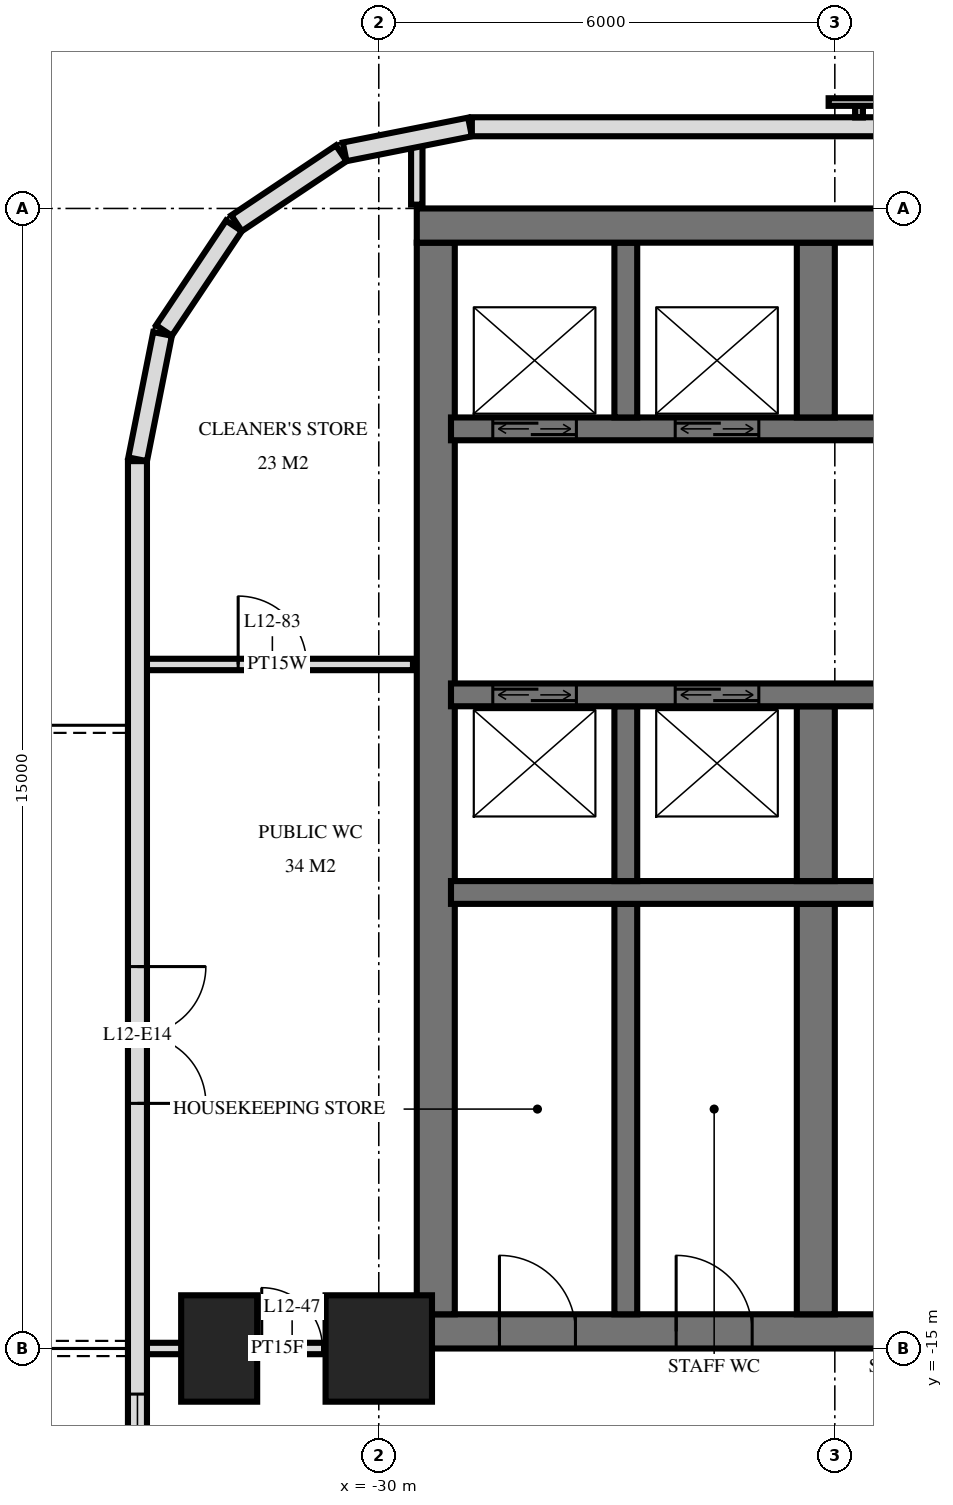
"""IFC4 building model, lengths in metres.
Left out: names, types, materials, properties, quantities, classifications, styles, units other than length and angle.
Written with IfcOpenShell. Run it as: python <this file> out.ifc"""

import sys

from ifc_helpers import new_model, si_unit, direction, frame, frame_2d, origin, origin_2d, place, context, subcontext, project, spatial, rectangle, extrude, element, fill, save


model = new_model("IFC4")
c1 = context("Model", 3, precision=1e-05, world=origin(), true_north=direction((0.0, 1.0)))
c2 = subcontext(c1, "Body", "Model", "MODEL_VIEW")
j1 = project(units=[si_unit("LENGTHUNIT", "METRE"), si_unit("PLANEANGLEUNIT", "RADIAN")], contexts=[c1])
p1 = place(None, origin())
s1 = spatial("IfcSite", under=j1, at=p1, CompositionType="ELEMENT")
p2 = place(p1, origin())
s2 = spatial("IfcBuilding", under=s1, at=p2, CompositionType="ELEMENT")
p3 = place(p2, frame((0.0, 0.0, 52.8)))
s3 = spatial("IfcBuildingStorey", under=s2, at=p3, CompositionType="ELEMENT", Elevation=52.8)
p4 = place(p3, frame((-32.1, -15.0, 0.0), z_axis=(0.0, 0.0, 1.0), x_axis=(0.0, 1.0, 0.0)))
e1 = element("IfcColumn", 1, at=p4, inside=s3, PredefinedType="COLUMN", context=c2, shape_type="SweptSolid", body=[
    extrude(rectangle(XDim=1.4, YDim=1.0, at=origin_2d()), origin(), (0.0, 0.0, 1.0), 3.6),
])
p5 = place(p3, frame((-30.0, -15.0, 0.0), z_axis=(0.0, 0.0, 1.0), x_axis=(1.0, 0.0, 0.0)))
e2 = element("IfcColumn", 2, at=p5, inside=s3, PredefinedType="COLUMN", context=c2, shape_type="SweptSolid", body=[
    extrude(rectangle(XDim=1.4, YDim=1.4, at=origin_2d()), origin(), (0.0, 0.0, 1.0), 3.6),
])
p6 = place(p3, frame((-29.5, -0.225, 0.0), z_axis=(0.0, 0.0, 1.0), x_axis=(1.0, 0.0, 0.0)))
e3 = element("IfcWall", 3, at=p6, inside=s3, PredefinedType="SHEAR", context=c2, shape_type="SweptSolid", body=[
    extrude(rectangle(XDim=19.5, YDim=0.45, at=frame_2d((9.75, 0.0))), origin(), (0.0, 0.0, 1.0), 3.6),
])
p7 = place(p3, frame((-29.5, -14.775, 0.0), z_axis=(0.0, 0.0, 1.0), x_axis=(1.0, 0.0, 0.0)))
e4 = element("IfcWall", 4, at=p7, inside=s3, PredefinedType="SHEAR", context=c2, shape_type="SweptSolid", body=[
    extrude(rectangle(XDim=19.5, YDim=0.45, at=frame_2d((9.75, 0.0))), origin(), (0.0, 0.0, 1.0), 3.6),
])
p8 = place(p7, frame((11.2, 0.0, 0.0)))
e5 = element("IfcOpeningElement", 5, at=p8, cuts=e4, PredefinedType="OPENING", context=c2, shape_type="SweptSolid", body=[
    extrude(rectangle(XDim=1.2, YDim=2.1, at=frame_2d((0.6, 1.05))), frame((0.0, 0.235, 0.0), z_axis=(0.0, -1.0, 0.0), x_axis=(1.0, 0.0, 0.0)), (0.0, 0.0, 1.0), 0.47),
])
p9 = place(p7, frame((14.25, 0.0, 0.0)))
e6 = element("IfcOpeningElement", 6, at=p9, cuts=e4, PredefinedType="OPENING", context=c2, shape_type="SweptSolid", body=[
    extrude(rectangle(XDim=1.1, YDim=2.1, at=frame_2d((0.55, 1.05))), frame((0.0, 0.235, 0.0), z_axis=(0.0, -1.0, 0.0), x_axis=(1.0, 0.0, 0.0)), (0.0, 0.0, 1.0), 0.47),
])
p10 = place(p7, frame((8.5, 0.0, 0.0)))
e7 = element("IfcOpeningElement", 7, at=p10, cuts=e4, PredefinedType="OPENING", context=c2, shape_type="SweptSolid", body=[
    extrude(rectangle(XDim=0.9, YDim=2.1, at=frame_2d((0.45, 1.05))), frame((0.0, 0.235, 0.0), z_axis=(0.0, -1.0, 0.0), x_axis=(1.0, 0.0, 0.0)), (0.0, 0.0, 1.0), 0.47),
])
p11 = place(p7, frame((6.05, 0.0, 0.0)))
e8 = element("IfcOpeningElement", 8, at=p11, cuts=e4, PredefinedType="OPENING", context=c2, shape_type="SweptSolid", body=[
    extrude(rectangle(XDim=1.0, YDim=2.1, at=frame_2d((0.5, 1.05))), frame((0.0, 0.235, 0.0), z_axis=(0.0, -1.0, 0.0), x_axis=(1.0, 0.0, 0.0)), (0.0, 0.0, 1.0), 0.47),
])
p12 = place(p7, frame((3.413, 0.0, 0.0)))
e9 = element("IfcOpeningElement", 9, at=p12, cuts=e4, PredefinedType="OPENING", context=c2, shape_type="SweptSolid", body=[
    extrude(rectangle(XDim=1.0, YDim=2.1, at=frame_2d((0.5, 1.05))), frame((0.0, 0.235, 0.0), z_axis=(0.0, -1.0, 0.0), x_axis=(1.0, 0.0, 0.0)), (0.0, 0.0, 1.0), 0.47),
])
p13 = place(p7, frame((1.087, 0.0, 0.0)))
e10 = element("IfcOpeningElement", 10, at=p13, cuts=e4, PredefinedType="OPENING", context=c2, shape_type="SweptSolid", body=[
    extrude(rectangle(XDim=1.0, YDim=2.1, at=frame_2d((0.5, 1.05))), frame((0.0, 0.235, 0.0), z_axis=(0.0, -1.0, 0.0), x_axis=(1.0, 0.0, 0.0)), (0.0, 0.0, 1.0), 0.47),
])
p14 = place(p3, frame((-29.25, -14.55, 0.0), z_axis=(0.0, 0.0, 1.0), x_axis=(0.0, 1.0, 0.0)))
e11 = element("IfcWall", 11, at=p14, inside=s3, PredefinedType="SHEAR", context=c2, shape_type="SweptSolid", body=[
    extrude(rectangle(XDim=14.1, YDim=0.5, at=frame_2d((7.05, 0.0))), origin(), (0.0, 0.0, 1.0), 3.6),
])
p15 = place(p3, frame((-29.05, -2.9, 0.0), z_axis=(0.0, 0.0, 1.0), x_axis=(1.0, 0.0, 0.0)))
e12 = element("IfcWall", 12, at=p15, inside=s3, PredefinedType="SHEAR", context=c2, shape_type="SweptSolid", body=[
    extrude(rectangle(XDim=18.7, YDim=0.3, at=frame_2d((9.35, 0.0))), origin(), (0.0, 0.0, 1.0), 3.6),
])
p16 = place(p15, frame((2.95, 0.0, 0.0)))
e13 = element("IfcOpeningElement", 13, at=p16, cuts=e12, PredefinedType="OPENING", context=c2, shape_type="SweptSolid", body=[
    extrude(rectangle(XDim=1.1, YDim=2.1, at=frame_2d((0.55, 1.05))), frame((0.0, 0.16, 0.0), z_axis=(0.0, -1.0, 0.0), x_axis=(1.0, 0.0, 0.0)), (0.0, 0.0, 1.0), 0.32),
])
p17 = place(p15, frame((0.55, 0.0, 0.0)))
e14 = element("IfcOpeningElement", 14, at=p17, cuts=e12, PredefinedType="OPENING", context=c2, shape_type="SweptSolid", body=[
    extrude(rectangle(XDim=1.1, YDim=2.1, at=frame_2d((0.55, 1.05))), frame((0.0, 0.16, 0.0), z_axis=(0.0, -1.0, 0.0), x_axis=(1.0, 0.0, 0.0)), (0.0, 0.0, 1.0), 0.32),
])
p18 = place(p15, frame((10.9, 0.0, 0.0)))
e15 = element("IfcOpeningElement", 15, at=p18, cuts=e12, PredefinedType="OPENING", context=c2, shape_type="SweptSolid", body=[
    extrude(rectangle(XDim=0.9, YDim=2.1, at=frame_2d((0.45, 1.05))), frame((0.0, 0.16, 0.0), z_axis=(0.0, -1.0, 0.0), x_axis=(1.0, 0.0, 0.0)), (0.0, 0.0, 1.0), 0.32),
])
p19 = place(p15, frame((16.85, 0.0, 0.0)))
e16 = element("IfcOpeningElement", 16, at=p19, cuts=e12, PredefinedType="OPENING", context=c2, shape_type="SweptSolid", body=[
    extrude(rectangle(XDim=1.0, YDim=2.1, at=frame_2d((0.5, 1.05))), frame((0.0, 0.16, 0.0), z_axis=(0.0, -1.0, 0.0), x_axis=(1.0, 0.0, 0.0)), (0.0, 0.0, 1.0), 0.32),
])
p20 = place(p15, frame((13.85, 0.0, 0.0)))
e17 = element("IfcOpeningElement", 17, at=p20, cuts=e12, PredefinedType="OPENING", context=c2, shape_type="SweptSolid", body=[
    extrude(rectangle(XDim=1.0, YDim=2.1, at=frame_2d((0.5, 1.05))), frame((0.0, 0.16, 0.0), z_axis=(0.0, -1.0, 0.0), x_axis=(1.0, 0.0, 0.0)), (0.0, 0.0, 1.0), 0.32),
])
p21 = place(p15, frame((5.6, 0.0, 0.0)))
e18 = element("IfcOpeningElement", 18, at=p21, cuts=e12, PredefinedType="OPENING", context=c2, shape_type="SweptSolid", body=[
    extrude(rectangle(XDim=1.0, YDim=2.1, at=frame_2d((0.5, 1.05))), frame((0.0, 0.16, 0.0), z_axis=(0.0, -1.0, 0.0), x_axis=(1.0, 0.0, 0.0)), (0.0, 0.0, 1.0), 0.32),
])
p22 = place(p3, frame((-29.05, -6.4, 0.0), z_axis=(0.0, 0.0, 1.0), x_axis=(1.0, 0.0, 0.0)))
e19 = element("IfcWall", 19, at=p22, inside=s3, PredefinedType="SHEAR", context=c2, shape_type="SweptSolid", body=[
    extrude(rectangle(XDim=18.7, YDim=0.3, at=frame_2d((9.35, 0.0))), origin(), (0.0, 0.0, 1.0), 3.6),
])
p23 = place(p22, frame((2.95, 0.0, 0.0)))
e20 = element("IfcOpeningElement", 20, at=p23, cuts=e19, PredefinedType="OPENING", context=c2, shape_type="SweptSolid", body=[
    extrude(rectangle(XDim=1.1, YDim=2.1, at=frame_2d((0.55, 1.05))), frame((0.0, 0.16, 0.0), z_axis=(0.0, -1.0, 0.0), x_axis=(1.0, 0.0, 0.0)), (0.0, 0.0, 1.0), 0.32),
])
p24 = place(p22, frame((0.55, 0.0, 0.0)))
e21 = element("IfcOpeningElement", 21, at=p24, cuts=e19, PredefinedType="OPENING", context=c2, shape_type="SweptSolid", body=[
    extrude(rectangle(XDim=1.1, YDim=2.1, at=frame_2d((0.55, 1.05))), frame((0.0, 0.16, 0.0), z_axis=(0.0, -1.0, 0.0), x_axis=(1.0, 0.0, 0.0)), (0.0, 0.0, 1.0), 0.32),
])
p25 = place(p22, frame((10.8, 0.0, 0.0)))
e22 = element("IfcOpeningElement", 22, at=p25, cuts=e19, PredefinedType="OPENING", context=c2, shape_type="SweptSolid", body=[
    extrude(rectangle(XDim=1.1, YDim=2.1, at=frame_2d((0.55, 1.05))), frame((0.0, 0.16, 0.0), z_axis=(0.0, -1.0, 0.0), x_axis=(1.0, 0.0, 0.0)), (0.0, 0.0, 1.0), 0.32),
])
p26 = place(p22, frame((5.6, 0.0, 0.0)))
e23 = element("IfcOpeningElement", 23, at=p26, cuts=e19, PredefinedType="OPENING", context=c2, shape_type="SweptSolid", body=[
    extrude(rectangle(XDim=1.0, YDim=2.1, at=frame_2d((0.5, 1.05))), frame((0.0, 0.16, 0.0), z_axis=(0.0, -1.0, 0.0), x_axis=(1.0, 0.0, 0.0)), (0.0, 0.0, 1.0), 0.32),
])
p27 = place(p3, frame((-29.05, -9.0, 0.0), z_axis=(0.0, 0.0, 1.0), x_axis=(1.0, 0.0, 0.0)))
e24 = element("IfcWall", 24, at=p27, inside=s3, PredefinedType="SHEAR", context=c2, shape_type="SweptSolid", body=[
    extrude(rectangle(XDim=18.7, YDim=0.3, at=frame_2d((9.35, 0.0))), origin(), (0.0, 0.0, 1.0), 3.6),
])
p28 = place(p27, frame((13.8, 0.0, 0.0)))
e25 = element("IfcOpeningElement", 25, at=p28, cuts=e24, PredefinedType="OPENING", context=c2, shape_type="SweptSolid", body=[
    extrude(rectangle(XDim=1.1, YDim=2.1, at=frame_2d((0.55, 1.05))), frame((0.0, 0.16, 0.0), z_axis=(0.0, -1.0, 0.0), x_axis=(1.0, 0.0, 0.0)), (0.0, 0.0, 1.0), 0.32),
])
for number, where, z_axis, x_axis in (
    (26, (-24.25, -2.75, 0.0), (0.0, 0.0, 1.0), (0.0, 1.0, 0.0)),
    (27, (-24.25, -8.85, 0.0), (0.0, 0.0, 1.0), (0.0, 1.0, 0.0)),
):
    element("IfcWall", number, at=place(p3, frame(where, z_axis=z_axis, x_axis=x_axis)), inside=s3, PredefinedType="SHEAR", context=c2, shape_type="SweptSolid", body=[
        extrude(rectangle(XDim=2.3, YDim=0.5, at=frame_2d((1.15, 0.0))), origin(), (0.0, 0.0, 1.0), 3.6),
    ])
p29 = place(p3, frame((-24.25, -14.55, 0.0), z_axis=(0.0, 0.0, 1.0), x_axis=(0.0, 1.0, 0.0)))
e28 = element("IfcWall", 28, at=p29, inside=s3, PredefinedType="SHEAR", context=c2, shape_type="SweptSolid", body=[
    extrude(rectangle(XDim=5.4, YDim=0.5, at=frame_2d((2.7, 0.0))), origin(), (0.0, 0.0, 1.0), 3.6),
])
for number, where, z_axis, x_axis in (
    (29, (-26.75, -2.75, 0.0), (0.0, 0.0, 1.0), (0.0, 1.0, 0.0)),
    (30, (-26.75, -8.85, 0.0), (0.0, 0.0, 1.0), (0.0, 1.0, 0.0)),
):
    element("IfcWall", number, at=place(p3, frame(where, z_axis=z_axis, x_axis=x_axis)), inside=s3, PredefinedType="SHEAR", context=c2, shape_type="SweptSolid", body=[
        extrude(rectangle(XDim=2.3, YDim=0.3, at=frame_2d((1.15, 0.0))), origin(), (0.0, 0.0, 1.0), 3.6),
    ])
p30 = place(p3, frame((-26.75, -14.55, 0.0), z_axis=(0.0, 0.0, 1.0), x_axis=(0.0, 1.0, 0.0)))
e31 = element("IfcWall", 31, at=p30, inside=s3, PredefinedType="SHEAR", context=c2, shape_type="SweptSolid", body=[
    extrude(rectangle(XDim=5.4, YDim=0.3, at=frame_2d((2.7, 0.0))), origin(), (0.0, 0.0, 1.0), 3.6),
])
p31 = place(p3, frame((28.775, 1.075, 0.0), z_axis=(0.0, 0.0, 1.0), x_axis=(-1.0, 0.0, 0.0)))
e32 = element("IfcWall", 32, at=p31, inside=s3, PredefinedType="SOLIDWALL", context=c2, shape_type="SweptSolid", body=[
    extrude(rectangle(XDim=57.551, YDim=0.25, at=frame_2d((28.775, 0.0))), origin(), (0.0, 0.0, 1.0), 3.32),
])
p32 = place(p31, frame((25.575, 0.0, 0.3)))
e33 = element("IfcOpeningElement", 33, at=p32, cuts=e32, PredefinedType="OPENING", context=c2, shape_type="SweptSolid", body=[
    extrude(rectangle(XDim=2.4, YDim=2.1, at=frame_2d((1.2, 1.05))), frame((0.0, 0.135, 0.0), z_axis=(0.0, -1.0, 0.0), x_axis=(1.0, 0.0, 0.0)), (0.0, 0.0, 1.0), 0.27),
])
p33 = place(p31, frame((30.275, 0.0, 0.3)))
e34 = element("IfcOpeningElement", 34, at=p33, cuts=e32, PredefinedType="OPENING", context=c2, shape_type="SweptSolid", body=[
    extrude(rectangle(XDim=2.4, YDim=2.1, at=frame_2d((1.2, 1.05))), frame((0.0, 0.135, 0.0), z_axis=(0.0, -1.0, 0.0), x_axis=(1.0, 0.0, 0.0)), (0.0, 0.0, 1.0), 0.27),
])
p34 = place(p31, frame((33.275, 0.0, 0.3)))
e35 = element("IfcOpeningElement", 35, at=p34, cuts=e32, PredefinedType="OPENING", context=c2, shape_type="SweptSolid", body=[
    extrude(rectangle(XDim=2.4, YDim=2.1, at=frame_2d((1.2, 1.05))), frame((0.0, 0.135, 0.0), z_axis=(0.0, -1.0, 0.0), x_axis=(1.0, 0.0, 0.0)), (0.0, 0.0, 1.0), 0.27),
])
p35 = place(p3, frame((-28.8, 1.073, 0.0), z_axis=(0.0, 0.0, 1.0), x_axis=(-0.980803419081, -0.194999110559, 0.0)))
e36 = element("IfcWall", 36, at=p35, inside=s3, PredefinedType="SOLIDWALL", context=c2, shape_type="SweptSolid", body=[
    extrude(rectangle(XDim=1.681, YDim=0.25, at=frame_2d((0.841, 0.0))), origin(), (0.0, 0.0, 1.0), 3.32),
])
for number, where, z_axis, x_axis in (
    (37, (-30.494, 0.726, 0.0), (0.0, 0.0, 1.0), (-0.831, -0.556, 0.0)),
    (38, (-31.906, -0.229, 0.0), (0.0, 0.0, 1.0), (-0.556, -0.831, 0.0)),
):
    element("IfcWall", number, at=place(p3, frame(where, z_axis=z_axis, x_axis=x_axis)), inside=s3, PredefinedType="SOLIDWALL", context=c2, shape_type="SweptSolid", body=[
        extrude(rectangle(XDim=1.656, YDim=0.25, at=frame_2d((0.828, 0.0))), origin(), (0.0, 0.0, 1.0), 3.32),
    ])
p36 = place(p3, frame((-32.844, -1.651, 0.0), z_axis=(0.0, 0.0, 1.0), x_axis=(-0.19513878023, -0.980775640221, 0.0)))
e39 = element("IfcWall", 39, at=p36, inside=s3, PredefinedType="SOLIDWALL", context=c2, shape_type="SweptSolid", body=[
    extrude(rectangle(XDim=1.681, YDim=0.25, at=frame_2d((0.841, 0.0))), origin(), (0.0, 0.0, 1.0), 3.32),
])
p37 = place(p3, frame((-33.175, -3.325, 0.0), z_axis=(0.0, 0.0, 1.0), x_axis=(0.0, -1.0, 0.0)))
e40 = element("IfcWall", 40, at=p37, inside=s3, PredefinedType="SOLIDWALL", context=c2, shape_type="SweptSolid", body=[
    extrude(rectangle(XDim=21.551, YDim=0.25, at=frame_2d((10.775, 0.0))), origin(), (0.0, 0.0, 1.0), 3.32),
])
p38 = place(p37, frame((6.65, 0.0, 0.0)))
e41 = element("IfcOpeningElement", 41, at=p38, cuts=e40, PredefinedType="OPENING", context=c2, shape_type="SweptSolid", body=[
    extrude(rectangle(XDim=1.8, YDim=2.4, at=frame_2d((0.9, 1.2))), frame((0.0, 0.135, 0.0), z_axis=(0.0, -1.0, 0.0), x_axis=(1.0, 0.0, 0.0)), (0.0, 0.0, 1.0), 0.27),
])
p39 = place(p37, frame((12.275, 0.0, 0.3)))
e42 = element("IfcOpeningElement", 42, at=p39, cuts=e40, PredefinedType="OPENING", context=c2, shape_type="SweptSolid", body=[
    extrude(rectangle(XDim=1.2, YDim=2.1, at=frame_2d((0.6, 1.05))), frame((0.0, 0.135, 0.0), z_axis=(0.0, -1.0, 0.0), x_axis=(1.0, 0.0, 0.0)), (0.0, 0.0, 1.0), 0.27),
])
p40 = place(p37, frame((14.675, 0.0, 0.0)))
e43 = element("IfcOpeningElement", 43, at=p40, cuts=e40, PredefinedType="OPENING", context=c2, shape_type="SweptSolid", body=[
    extrude(rectangle(XDim=1.8, YDim=2.4, at=frame_2d((0.9, 1.2))), frame((0.0, 0.135, 0.0), z_axis=(0.0, -1.0, 0.0), x_axis=(1.0, 0.0, 0.0)), (0.0, 0.0, 1.0), 0.27),
])
p41 = place(p37, frame((18.875, 0.0, 0.0)))
e44 = element("IfcOpeningElement", 44, at=p41, cuts=e40, PredefinedType="OPENING", context=c2, shape_type="SweptSolid", body=[
    extrude(rectangle(XDim=1.8, YDim=2.4, at=frame_2d((0.9, 1.2))), frame((0.0, 0.135, 0.0), z_axis=(0.0, -1.0, 0.0), x_axis=(1.0, 0.0, 0.0)), (0.0, 0.0, 1.0), 0.27),
])
p42 = place(p3, frame((-29.5, 0.05, 0.0), z_axis=(0.0, 0.0, 1.0), x_axis=(0.0, 1.0, 0.0)))
e45 = element("IfcWall", 45, at=p42, inside=s3, PredefinedType="PARTITIONING", context=c2, shape_type="SweptSolid", body=[
    extrude(rectangle(XDim=0.827, YDim=0.15, at=frame_2d((0.414, 0.0))), origin(), (0.0, 0.0, 1.0), 3.32),
])
p43 = place(p3, frame((-33.12, -15.0, 0.0), z_axis=(0.0, 0.0, 1.0), x_axis=(1.0, 0.0, 0.0)))
e46 = element("IfcWall", 46, at=p43, inside=s3, PredefinedType="PARTITIONING", context=c2, shape_type="SweptSolid", body=[
    extrude(rectangle(XDim=3.57, YDim=0.15, at=frame_2d((1.785, 0.0))), origin(), (0.0, 0.0, 1.0), 3.32),
])
p44 = place(p43, frame((1.58, 0.0, 0.0)))
e47 = element("IfcOpeningElement", 47, at=p44, cuts=e46, PredefinedType="OPENING", context=c2, shape_type="SweptSolid", body=[
    extrude(rectangle(XDim=0.8, YDim=2.1, at=frame_2d((0.4, 1.05))), frame((0.0, 0.085, 0.0), z_axis=(0.0, -1.0, 0.0), x_axis=(1.0, 0.0, 0.0)), (0.0, 0.0, 1.0), 0.17),
])
p45 = place(p3, frame((-33.12, -6.0, 0.0), z_axis=(0.0, 0.0, 1.0), x_axis=(1.0, 0.0, 0.0)))
e48 = element("IfcWall", 48, at=p45, inside=s3, PredefinedType="PLUMBINGWALL", context=c2, shape_type="SweptSolid", body=[
    extrude(rectangle(XDim=3.57, YDim=0.15, at=frame_2d((1.785, 0.0))), origin(), (0.0, 0.0, 1.0), 3.32),
])
p46 = place(p45, frame((1.27, 0.0, 0.0)))
e49 = element("IfcOpeningElement", 49, at=p46, cuts=e48, PredefinedType="OPENING", context=c2, shape_type="SweptSolid", body=[
    extrude(rectangle(XDim=0.9, YDim=2.1, at=frame_2d((0.45, 1.05))), frame((0.0, 0.085, 0.0), z_axis=(0.0, -1.0, 0.0), x_axis=(1.0, 0.0, 0.0)), (0.0, 0.0, 1.0), 0.17),
])
p47 = place(p38, origin())
e50 = element("IfcDoor", 50, at=p47, inside=s3, OperationType="DOUBLE_DOOR_SINGLE_SWING", PredefinedType="DOOR", context=c2, shape_type="SweptSolid", body=[
    extrude(rectangle(XDim=1.8, YDim=2.4, at=frame_2d((0.9, 1.2))), frame((0.0, 0.025, 0.0), z_axis=(0.0, -1.0, 0.0), x_axis=(1.0, 0.0, 0.0)), (0.0, 0.0, 1.0), 0.05),
])
fill(e41, e50)
p48 = place(p39, origin())
e51 = element("IfcWindow", 51, at=p48, inside=s3, PartitioningType="SINGLE_PANEL", PredefinedType="WINDOW", context=c2, shape_type="SweptSolid", body=[
    extrude(rectangle(XDim=1.2, YDim=2.1, at=frame_2d((0.6, 1.05))), frame((0.0, 0.03, 0.0), z_axis=(0.0, -1.0, 0.0), x_axis=(1.0, 0.0, 0.0)), (0.0, 0.0, 1.0), 0.06),
])
fill(e42, e51)
p49 = place(p16, origin())
e52 = element("IfcDoor", 52, at=p49, inside=s3, OperationType="DOUBLE_DOOR_SLIDING", PredefinedType="USERDEFINED", context=c2, shape_type="SweptSolid", body=[
    extrude(rectangle(XDim=1.1, YDim=2.1, at=frame_2d((0.55, 1.05))), frame((0.0, 0.025, 0.0), z_axis=(0.0, -1.0, 0.0), x_axis=(1.0, 0.0, 0.0)), (0.0, 0.0, 1.0), 0.05),
])
fill(e13, e52)
p50 = place(p17, origin())
e53 = element("IfcDoor", 53, at=p50, inside=s3, OperationType="DOUBLE_DOOR_SLIDING", PredefinedType="USERDEFINED", context=c2, shape_type="SweptSolid", body=[
    extrude(rectangle(XDim=1.1, YDim=2.1, at=frame_2d((0.55, 1.05))), frame((0.0, 0.025, 0.0), z_axis=(0.0, -1.0, 0.0), x_axis=(1.0, 0.0, 0.0)), (0.0, 0.0, 1.0), 0.05),
])
fill(e14, e53)
p51 = place(p23, origin())
e54 = element("IfcDoor", 54, at=p51, inside=s3, OperationType="DOUBLE_DOOR_SLIDING", PredefinedType="USERDEFINED", context=c2, shape_type="SweptSolid", body=[
    extrude(rectangle(XDim=1.1, YDim=2.1, at=frame_2d((0.55, 1.05))), frame((0.0, 0.025, 0.0), z_axis=(0.0, -1.0, 0.0), x_axis=(1.0, 0.0, 0.0)), (0.0, 0.0, 1.0), 0.05),
])
fill(e20, e54)
p52 = place(p24, origin())
e55 = element("IfcDoor", 55, at=p52, inside=s3, OperationType="DOUBLE_DOOR_SLIDING", PredefinedType="USERDEFINED", context=c2, shape_type="SweptSolid", body=[
    extrude(rectangle(XDim=1.1, YDim=2.1, at=frame_2d((0.55, 1.05))), frame((0.0, 0.025, 0.0), z_axis=(0.0, -1.0, 0.0), x_axis=(1.0, 0.0, 0.0)), (0.0, 0.0, 1.0), 0.05),
])
fill(e21, e55)
p53 = place(p12, origin())
e56 = element("IfcDoor", 56, at=p53, inside=s3, OperationType="SINGLE_SWING_RIGHT", PredefinedType="DOOR", context=c2, shape_type="SweptSolid", body=[
    extrude(rectangle(XDim=1.0, YDim=2.1, at=frame_2d((0.5, 1.05))), frame((0.0, 0.025, 0.0), z_axis=(0.0, -1.0, 0.0), x_axis=(1.0, 0.0, 0.0)), (0.0, 0.0, 1.0), 0.05),
])
fill(e9, e56)
p54 = place(p13, origin())
e57 = element("IfcDoor", 57, at=p54, inside=s3, OperationType="SINGLE_SWING_RIGHT", PredefinedType="DOOR", context=c2, shape_type="SweptSolid", body=[
    extrude(rectangle(XDim=1.0, YDim=2.1, at=frame_2d((0.5, 1.05))), frame((0.0, 0.025, 0.0), z_axis=(0.0, -1.0, 0.0), x_axis=(1.0, 0.0, 0.0)), (0.0, 0.0, 1.0), 0.05),
])
fill(e10, e57)
p55 = place(p44, origin())
e58 = element("IfcDoor", 58, at=p55, inside=s3, OperationType="SINGLE_SWING_RIGHT", PredefinedType="DOOR", context=c2, shape_type="SweptSolid", body=[
    extrude(rectangle(XDim=0.8, YDim=2.1, at=frame_2d((0.4, 1.05))), frame((0.0, 0.025, 0.0), z_axis=(0.0, -1.0, 0.0), x_axis=(1.0, 0.0, 0.0)), (0.0, 0.0, 1.0), 0.05),
])
fill(e47, e58)
p56 = place(p46, origin())
e59 = element("IfcDoor", 59, at=p56, inside=s3, OperationType="SINGLE_SWING_RIGHT", PredefinedType="DOOR", context=c2, shape_type="SweptSolid", body=[
    extrude(rectangle(XDim=0.9, YDim=2.1, at=frame_2d((0.45, 1.05))), frame((0.0, 0.025, 0.0), z_axis=(0.0, -1.0, 0.0), x_axis=(1.0, 0.0, 0.0)), (0.0, 0.0, 1.0), 0.05),
])
fill(e49, e59)
save(model, sys.argv[1])
